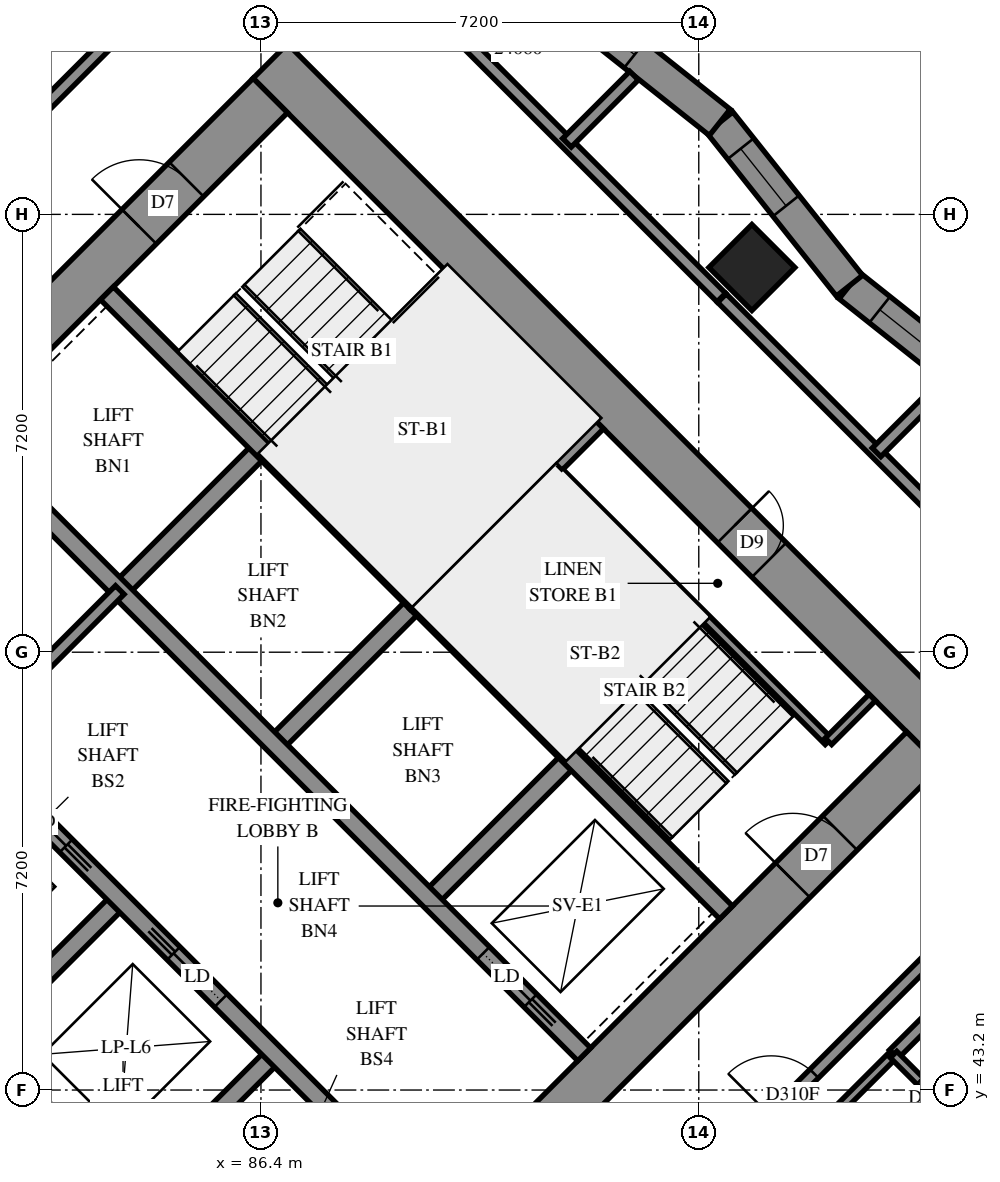
"""IFC4 building model, lengths in metres.
Left out: names, types, materials, properties, quantities, classifications, styles, units other than length and angle.
Written with IfcOpenShell. Run it as: python <this file> out.ifc"""

import sys

from ifc_helpers import new_model, si_unit, direction, frame, frame_2d, origin, origin_2d, place, context, subcontext, project, spatial, polyline, rectangle, outline, extrude, element, fill, save


model = new_model("IFC4")
c1 = context("Model", 3, precision=1e-05, world=origin(), true_north=direction((0.0, 1.0)))
c2 = subcontext(c1, "Body", "Model", "MODEL_VIEW")
j1 = project(units=[si_unit("LENGTHUNIT", "METRE"), si_unit("PLANEANGLEUNIT", "RADIAN")], contexts=[c1])
p1 = place(None, origin())
s1 = spatial("IfcSite", under=j1, at=p1, CompositionType="ELEMENT")
p2 = place(p1, origin())
s2 = spatial("IfcBuilding", under=s1, at=p2, CompositionType="ELEMENT")
p3 = place(p2, frame((0.0, 0.0, 91.4)))
s3 = spatial("IfcBuildingStorey", under=s2, at=p3, CompositionType="ELEMENT", Elevation=91.4)
p4 = place(p3, frame((94.474, 56.727, 0.0), z_axis=(0.0, 0.0, 1.0), x_axis=(0.7071067812, -0.7071067812, 0.0)))
e1 = element("IfcColumn", 1, at=p4, inside=s3, PredefinedType="COLUMN", context=c2, shape_type="SweptSolid", body=[
    extrude(rectangle(XDim=1.0, YDim=1.0, at=origin_2d()), origin(), (0.0, 0.0, 1.0), 3.1),
])
p5 = place(p3, frame((75.806, 49.373, -0.3), z_axis=(0.0, 0.0, 1.0), x_axis=(0.7071067812, -0.7071067812, 0.0)))
e2 = element("IfcWall", 2, at=p5, inside=s3, PredefinedType="SHEAR", context=c2, shape_type="SweptSolid", body=[
    extrude(rectangle(XDim=16.0, YDim=0.8, at=frame_2d((8.0, 0.0))), origin(), (0.0, 0.0, 1.0), 2.7),
])
p6 = place(p3, frame((86.554, 60.121, -0.3), z_axis=(0.0, 0.0, 1.0), x_axis=(0.7071067812, -0.7071067812, 0.0)))
e3 = element("IfcWall", 3, at=p6, inside=s3, PredefinedType="SHEAR", context=c2, shape_type="SweptSolid", body=[
    extrude(rectangle(XDim=16.0, YDim=0.8, at=frame_2d((8.0, 0.0))), origin(), (0.0, 0.0, 1.0), 2.7),
])
p7 = place(p6, frame((10.8, 0.0, 0.3)))
e4 = element("IfcOpeningElement", 4, at=p7, cuts=e3, PredefinedType="OPENING", context=c2, shape_type="SweptSolid", body=[
    extrude(rectangle(XDim=0.8, YDim=2.1, at=frame_2d((0.4, 1.05))), frame((0.0, 0.41, 0.0), z_axis=(0.0, -1.0, 0.0), x_axis=(1.0, 0.0, 0.0)), (0.0, 0.0, 1.0), 0.82),
])
p8 = place(p3, frame((76.372, 49.373, -0.3), z_axis=(0.0, 0.0, 1.0), x_axis=(0.7071067812, 0.7071067812, 0.0)))
e5 = element("IfcWall", 5, at=p8, inside=s3, PredefinedType="SHEAR", context=c2, shape_type="SweptSolid", body=[
    extrude(rectangle(XDim=14.4, YDim=0.8, at=frame_2d((7.2, 0.0))), origin(), (0.0, 0.0, 1.0), 2.7),
])
p9 = place(p8, frame((4.55, 0.0, 0.3)))
e6 = element("IfcOpeningElement", 6, at=p9, cuts=e5, PredefinedType="OPENING", context=c2, shape_type="SweptSolid", body=[
    extrude(rectangle(XDim=1.1, YDim=2.1, at=frame_2d((0.55, 1.05))), frame((0.0, 0.41, 0.0), z_axis=(0.0, -1.0, 0.0), x_axis=(1.0, 0.0, 0.0)), (0.0, 0.0, 1.0), 0.82),
])
p10 = place(p8, frame((11.35, 0.0, 0.3)))
e7 = element("IfcOpeningElement", 7, at=p10, cuts=e5, PredefinedType="OPENING", context=c2, shape_type="SweptSolid", body=[
    extrude(rectangle(XDim=1.1, YDim=2.1, at=frame_2d((0.55, 1.05))), frame((0.0, 0.41, 0.0), z_axis=(0.0, -1.0, 0.0), x_axis=(1.0, 0.0, 0.0)), (0.0, 0.0, 1.0), 0.82),
])
p11 = place(p3, frame((87.12, 38.625, -0.3), z_axis=(0.0, 0.0, 1.0), x_axis=(0.7071067812, 0.7071067812, 0.0)))
e8 = element("IfcWall", 8, at=p11, inside=s3, PredefinedType="SHEAR", context=c2, shape_type="SweptSolid", body=[
    extrude(rectangle(XDim=14.4, YDim=0.8, at=frame_2d((7.2, 0.0))), origin(), (0.0, 0.0, 1.0), 2.7),
])
p12 = place(p11, frame((4.55, 0.0, 0.3)))
e9 = element("IfcOpeningElement", 9, at=p12, cuts=e8, PredefinedType="OPENING", context=c2, shape_type="SweptSolid", body=[
    extrude(rectangle(XDim=1.1, YDim=2.1, at=frame_2d((0.55, 1.05))), frame((0.0, 0.41, 0.0), z_axis=(0.0, -1.0, 0.0), x_axis=(1.0, 0.0, 0.0)), (0.0, 0.0, 1.0), 0.82),
])
p13 = place(p11, frame((11.35, 0.0, 0.3)))
e10 = element("IfcOpeningElement", 10, at=p13, cuts=e8, PredefinedType="OPENING", context=c2, shape_type="SweptSolid", body=[
    extrude(rectangle(XDim=1.1, YDim=2.1, at=frame_2d((0.55, 1.05))), frame((0.0, 0.41, 0.0), z_axis=(0.0, -1.0, 0.0), x_axis=(1.0, 0.0, 0.0)), (0.0, 0.0, 1.0), 0.82),
])
p14 = place(p3, frame((84.079, 51.423, 0.0), z_axis=(0.0, 0.0, 1.0), x_axis=(0.7071219326, 0.7070916295, 0.0)))
e11 = element("IfcWall", 11, at=p14, inside=s3, PredefinedType="SOLIDWALL", context=c2, shape_type="SweptSolid", body=[
    extrude(rectangle(XDim=3.3, YDim=0.3, at=frame_2d((1.65, 0.0))), origin(), (0.0, 0.0, 1.0), 3.1),
])
p15 = place(p3, frame((81.746, 43.999, 0.0), z_axis=(0.0, 0.0, 1.0), x_axis=(0.7071067812, 0.7071067812, 0.0)))
e12 = element("IfcWall", 12, at=p15, inside=s3, PredefinedType="SOLIDWALL", context=c2, shape_type="SweptSolid", body=[
    extrude(rectangle(XDim=3.3, YDim=0.3, at=frame_2d((1.65, 0.0))), origin(), (0.0, 0.0, 1.0), 3.1),
])
p16 = place(p3, frame((86.625, 48.878, 0.0), z_axis=(0.0, 0.0, 1.0), x_axis=(0.7071067812, 0.7071067812, 0.0)))
e13 = element("IfcWall", 13, at=p16, inside=s3, PredefinedType="SOLIDWALL", context=c2, shape_type="SweptSolid", body=[
    extrude(rectangle(XDim=3.3, YDim=0.3, at=frame_2d((1.65, 0.0))), origin(), (0.0, 0.0, 1.0), 3.1),
])
p17 = place(p3, frame((84.291, 41.453, 0.0), z_axis=(0.0, 0.0, 1.0), x_axis=(0.7071067812, 0.7071067812, 0.0)))
e14 = element("IfcWall", 14, at=p17, inside=s3, PredefinedType="SOLIDWALL", context=c2, shape_type="SweptSolid", body=[
    extrude(rectangle(XDim=3.3, YDim=0.3, at=frame_2d((1.65, 0.0))), origin(), (0.0, 0.0, 1.0), 3.1),
])
p18 = place(p3, frame((89.17, 46.332, 0.0), z_axis=(0.0, 0.0, 1.0), x_axis=(0.7071067812, 0.7071067812, 0.0)))
e15 = element("IfcWall", 15, at=p18, inside=s3, PredefinedType="SOLIDWALL", context=c2, shape_type="SweptSolid", body=[
    extrude(rectangle(XDim=3.3, YDim=0.3, at=frame_2d((1.65, 0.0))), origin(), (0.0, 0.0, 1.0), 3.1),
])
p19 = place(p3, frame((78.988, 51.423, 0.0), z_axis=(0.0, 0.0, 1.0), x_axis=(0.7071067812, -0.7071067812, 0.0)))
e16 = element("IfcWall", 16, at=p19, inside=s3, PredefinedType="SOLIDWALL", context=c2, shape_type="SweptSolid", body=[
    extrude(rectangle(XDim=14.4, YDim=0.3, at=frame_2d((7.2, 0.0))), origin(), (0.0, 0.0, 1.0), 3.1),
])
p20 = place(p19, frame((1.25, 0.0, 0.0)))
e17 = element("IfcOpeningElement", 17, at=p20, cuts=e16, PredefinedType="OPENING", context=c2, shape_type="SweptSolid", body=[
    extrude(rectangle(XDim=1.1, YDim=2.1, at=frame_2d((0.55, 1.05))), frame((0.0, 0.16, 0.0), z_axis=(0.0, -1.0, 0.0), x_axis=(1.0, 0.0, 0.0)), (0.0, 0.0, 1.0), 0.32),
])
p21 = place(p19, frame((4.85, 0.0, 0.0)))
e18 = element("IfcOpeningElement", 18, at=p21, cuts=e16, PredefinedType="OPENING", context=c2, shape_type="SweptSolid", body=[
    extrude(rectangle(XDim=1.1, YDim=2.1, at=frame_2d((0.55, 1.05))), frame((0.0, 0.16, 0.0), z_axis=(0.0, -1.0, 0.0), x_axis=(1.0, 0.0, 0.0)), (0.0, 0.0, 1.0), 0.32),
])
p22 = place(p19, frame((8.45, 0.0, 0.0)))
e19 = element("IfcOpeningElement", 19, at=p22, cuts=e16, PredefinedType="OPENING", context=c2, shape_type="SweptSolid", body=[
    extrude(rectangle(XDim=1.1, YDim=2.1, at=frame_2d((0.55, 1.05))), frame((0.0, 0.16, 0.0), z_axis=(0.0, -1.0, 0.0), x_axis=(1.0, 0.0, 0.0)), (0.0, 0.0, 1.0), 0.32),
])
p23 = place(p19, frame((12.05, 0.0, 0.0)))
e20 = element("IfcOpeningElement", 20, at=p23, cuts=e16, PredefinedType="OPENING", context=c2, shape_type="SweptSolid", body=[
    extrude(rectangle(XDim=1.1, YDim=2.1, at=frame_2d((0.55, 1.05))), frame((0.0, 0.16, 0.0), z_axis=(0.0, -1.0, 0.0), x_axis=(1.0, 0.0, 0.0)), (0.0, 0.0, 1.0), 0.32),
])
p24 = place(p3, frame((81.534, 53.969, 0.0), z_axis=(0.0, 0.0, 1.0), x_axis=(0.707103309, -0.7071102534, 0.0)))
e21 = element("IfcWall", 21, at=p24, inside=s3, PredefinedType="SOLIDWALL", context=c2, shape_type="SweptSolid", body=[
    extrude(rectangle(XDim=14.4, YDim=0.3, at=frame_2d((7.2, 0.0))), origin(), (0.0, 0.0, 1.0), 3.1),
])
p25 = place(p24, frame((12.05, 0.0, 0.0)))
e22 = element("IfcOpeningElement", 22, at=p25, cuts=e21, PredefinedType="OPENING", context=c2, shape_type="SweptSolid", body=[
    extrude(rectangle(XDim=1.1, YDim=2.1, at=frame_2d((0.55, 1.05))), frame((0.0, 0.16, 0.0), z_axis=(0.0, -1.0, 0.0), x_axis=(1.0, 0.0, 0.0)), (0.0, 0.0, 1.0), 0.32),
])
for number, where, z_axis, x_axis in (
    (23, (83.867, 56.302, 0.0), (0.0, 0.0, 1.0), (0.707, -0.707, 0.0)),
    (24, (88.958, 51.211, 0.0), (0.0, 0.0, 1.0), (0.707, -0.707, 0.0)),
):
    element("IfcWall", number, at=place(p3, frame(where, z_axis=z_axis, x_axis=x_axis)), inside=s3, PredefinedType="SOLIDWALL", context=c2, shape_type="SweptSolid", body=[
        extrude(rectangle(XDim=7.2, YDim=0.3, at=frame_2d((3.6, 0.0))), origin(), (0.0, 0.0, 1.0), 3.1),
    ])
p26 = place(p3, frame((88.958, 51.211, 0.0), z_axis=(0.0, 0.0, 1.0), x_axis=(0.7071067812, 0.7071067812, 0.0)))
e25 = element("IfcWall", 25, at=p26, inside=s3, PredefinedType="SOLIDWALL", context=c2, shape_type="SweptSolid", body=[
    extrude(rectangle(XDim=4.2, YDim=0.3, at=frame_2d((2.1, 0.0))), origin(), (0.0, 0.0, 1.0), 3.1),
])
p27 = place(p3, frame((98.764, 54.294, 0.0), z_axis=(0.0, 0.0, 1.0), x_axis=(-0.7831079243, 0.6218858246, 0.0)))
e26 = element("IfcWall", 26, at=p27, inside=s3, PredefinedType="SOLIDWALL", context=c2, shape_type="SweptSolid", body=[
    extrude(outline(polyline([(-0.032, -0.275), (3.398, -0.275), (3.462, 0.275), (0.032, 0.275), (-0.032, -0.275)])), origin(), (0.0, 0.0, 1.0), 3.1),
])
p28 = place(p27, frame((1.596, 0.0, 0.5)))
e27 = element("IfcOpeningElement", 27, at=p28, cuts=e26, PredefinedType="OPENING", context=c2, shape_type="SweptSolid", body=[
    extrude(rectangle(XDim=1.2, YDim=2.45, at=frame_2d((0.6, 1.225))), frame((0.0, 0.285, 0.0), z_axis=(0.0, -1.0, 0.0), x_axis=(1.0, 0.0, 0.0)), (0.0, 0.0, 1.0), 0.57),
])
p29 = place(p3, frame((96.078, 56.427, 0.0), z_axis=(0.0, 0.0, 1.0), x_axis=(-0.6218858246, 0.7831079243, 0.0)))
e28 = element("IfcWall", 28, at=p29, inside=s3, PredefinedType="SOLIDWALL", context=c2, shape_type="SweptSolid", body=[
    extrude(outline(polyline([(0.032, -0.275), (3.462, -0.275), (3.398, 0.275), (-0.032, 0.275), (0.032, -0.275)])), origin(), (0.0, 0.0, 1.0), 3.1),
])
p30 = place(p29, frame((1.677, 0.0, 0.5)))
e29 = element("IfcOpeningElement", 29, at=p30, cuts=e28, PredefinedType="OPENING", context=c2, shape_type="SweptSolid", body=[
    extrude(rectangle(XDim=1.2, YDim=2.45, at=frame_2d((0.6, 1.225))), frame((0.0, 0.285, 0.0), z_axis=(0.0, -1.0, 0.0), x_axis=(1.0, 0.0, 0.0)), (0.0, 0.0, 1.0), 0.57),
])
p31 = place(p3, frame((93.945, 59.113, 0.0), z_axis=(0.0, 0.0, 1.0), x_axis=(-0.7830966489, 0.621900023, 0.0)))
e30 = element("IfcWall", 30, at=p31, inside=s3, PredefinedType="SOLIDWALL", context=c2, shape_type="SweptSolid", body=[
    extrude(outline(polyline([(-0.032, -0.275), (3.398, -0.275), (3.462, 0.275), (0.032, 0.275), (-0.032, -0.275)])), origin(), (0.0, 0.0, 1.0), 3.1),
])
p32 = place(p31, frame((1.789, 0.0, 0.5)))
e31 = element("IfcOpeningElement", 31, at=p32, cuts=e30, PredefinedType="OPENING", context=c2, shape_type="SweptSolid", body=[
    extrude(rectangle(XDim=1.2, YDim=2.45, at=frame_2d((0.6, 1.225))), frame((0.0, 0.285, 0.0), z_axis=(0.0, -1.0, 0.0), x_axis=(1.0, 0.0, 0.0)), (0.0, 0.0, 1.0), 0.57),
])
p33 = place(p3, frame((91.313, 53.354, 0.0), z_axis=(0.0, 0.0, 1.0), x_axis=(0.7071147811, -0.7070987812, 0.0)))
e32 = element("IfcWall", 32, at=p33, inside=s3, PredefinedType="PARTITIONING", context=c2, shape_type="SweptSolid", body=[
    extrude(rectangle(XDim=6.25, YDim=0.15, at=frame_2d((3.125, 0.0))), origin(), (0.0, 0.0, 1.0), 3.1),
])
p34 = place(p3, frame((95.732, 48.934, 0.0), z_axis=(0.0, 0.0, 1.0), x_axis=(0.7071067812, 0.7071067812, 0.0)))
e33 = element("IfcWall", 33, at=p34, inside=s3, PredefinedType="PARTITIONING", context=c2, shape_type="SweptSolid", body=[
    extrude(rectangle(XDim=1.02, YDim=0.15, at=frame_2d((0.51, 0.0))), origin(), (0.0, 0.0, 1.0), 3.1),
])
p35 = place(p3, frame((81.534, 48.878, 0.0), z_axis=(0.0, 0.0, 1.0), x_axis=(0.707092892, 0.7071206701, 0.0)))
e34 = element("IfcWall", 34, at=p35, inside=s3, PredefinedType="PARTITIONING", context=c2, shape_type="SweptSolid", body=[
    extrude(rectangle(XDim=3.6, YDim=0.2, at=frame_2d((1.8, 0.0))), origin(), (0.0, 0.0, 1.0), 3.1),
])
p36 = place(p3, frame((94.615, 42.587, 0.0), z_axis=(0.0, 0.0, 1.0), x_axis=(0.7071067812, 0.7071067812, 0.0)))
e35 = element("IfcWall", 35, at=p36, inside=s3, PredefinedType="PARTITIONING", context=c2, shape_type="SweptSolid", body=[
    extrude(rectangle(XDim=9.198, YDim=0.2, at=frame_2d((4.599, 0.0))), origin(), (0.0, 0.0, 1.0), 3.1),
])
p37 = place(p36, frame((0.248, 0.0, 0.0)))
e36 = element("IfcOpeningElement", 36, at=p37, cuts=e35, PredefinedType="OPENING", context=c2, shape_type="SweptSolid", body=[
    extrude(rectangle(XDim=1.0, YDim=2.1, at=frame_2d((0.5, 1.05))), frame((0.0, 0.11, 0.0), z_axis=(0.0, -1.0, 0.0), x_axis=(1.0, 0.0, 0.0)), (0.0, 0.0, 1.0), 0.22),
])
p38 = place(p3, frame((80.949, 58.477, 0.0), z_axis=(0.0, 0.0, 1.0), x_axis=(0.7071122504, 0.707101312, 0.0)))
e37 = element("IfcWall", 37, at=p38, inside=s3, PredefinedType="PARTITIONING", context=c2, shape_type="SweptSolid", body=[
    extrude(rectangle(XDim=9.142, YDim=0.2, at=frame_2d((4.571, 0.0))), origin(), (0.0, 0.0, 1.0), 3.1),
])
p39 = place(p3, frame((96.805, 43.787, 0.0), z_axis=(0.0, 0.0, 1.0), x_axis=(0.7071126983, 0.707100864, 0.0)))
e38 = element("IfcWall", 38, at=p39, inside=s3, PredefinedType="PARTITIONING", context=c2, shape_type="SweptSolid", body=[
    extrude(rectangle(XDim=8.45, YDim=0.2, at=frame_2d((4.225, 0.0))), origin(), (0.0, 0.0, 1.0), 3.1),
])
p40 = place(p3, frame((80.951, 57.489, 0.0), z_axis=(0.0, 0.0, 1.0), x_axis=(0.7071067812, 0.7071067812, 0.0)))
e39 = element("IfcWall", 39, at=p40, inside=s3, PredefinedType="PARTITIONING", context=c2, shape_type="SweptSolid", body=[
    extrude(rectangle(XDim=8.321, YDim=0.2, at=frame_2d((4.161, 0.0))), origin(), (0.0, 0.0, 1.0), 3.1),
])
p41 = place(p40, frame((0.851, 0.0, 0.0)))
e40 = element("IfcOpeningElement", 40, at=p41, cuts=e39, PredefinedType="OPENING", context=c2, shape_type="SweptSolid", body=[
    extrude(rectangle(XDim=1.0, YDim=2.1, at=frame_2d((0.5, 1.05))), frame((0.0, 0.11, 0.0), z_axis=(0.0, -1.0, 0.0), x_axis=(1.0, 0.0, 0.0)), (0.0, 0.0, 1.0), 0.22),
])
p42 = place(p3, frame((88.889, 61.315, 0.0), z_axis=(0.0, 0.0, 1.0), x_axis=(0.7071067812, -0.7071067812, 0.0)))
e41 = element("IfcWall", 41, at=p42, inside=s3, PredefinedType="PARTITIONING", context=c2, shape_type="SweptSolid", body=[
    extrude(rectangle(XDim=7.187, YDim=0.2, at=frame_2d((3.594, 0.0))), origin(), (0.0, 0.0, 1.0), 3.1),
])
p43 = place(p3, frame((93.981, 56.223, 0.0), z_axis=(0.0, 0.0, 1.0), x_axis=(0.7071067812, -0.7071067812, 0.0)))
e42 = element("IfcWall", 42, at=p43, inside=s3, PredefinedType="PARTITIONING", context=c2, shape_type="SweptSolid", body=[
    extrude(rectangle(XDim=7.184, YDim=0.2, at=frame_2d((3.592, 0.0))), origin(), (0.0, 0.0, 1.0), 3.1),
])
p44 = place(p3, frame((95.109, 42.091, 0.0), z_axis=(0.0, 0.0, 1.0), x_axis=(0.7071067812, 0.7071067812, 0.0)))
e43 = element("IfcWall", 43, at=p44, inside=s3, PredefinedType="PARTITIONING", context=c2, shape_type="SweptSolid", body=[
    extrude(rectangle(XDim=2.398, YDim=0.15, at=frame_2d((1.199, 0.0))), origin(), (0.0, 0.0, 1.0), 3.1),
])
p45 = place(p3, frame((96.803, 43.783, 0.0), z_axis=(0.0, 0.0, 1.0), x_axis=(0.7071067812, -0.7071067812, 0.0)))
e44 = element("IfcWall", 44, at=p45, inside=s3, PredefinedType="PARTITIONING", context=c2, shape_type="SweptSolid", body=[
    extrude(rectangle(XDim=1.901, YDim=0.15, at=frame_2d((0.95, 0.0))), origin(), (0.0, 0.0, 1.0), 3.1),
])
p46 = place(p45, frame((0.609, 0.0, 0.0)))
e45 = element("IfcOpeningElement", 45, at=p46, cuts=e44, PredefinedType="OPENING", context=c2, shape_type="SweptSolid", body=[
    extrude(rectangle(XDim=0.8, YDim=2.1, at=frame_2d((0.4, 1.05))), frame((0.0, 0.085, 0.0), z_axis=(0.0, -1.0, 0.0), x_axis=(1.0, 0.0, 0.0)), (0.0, 0.0, 1.0), 0.17),
])
p47 = place(p3, frame((96.523, 53.687, 0.0), z_axis=(0.0, 0.0, 1.0), x_axis=(0.7070756263, 0.7071379347, 0.0)))
e46 = element("IfcWall", 46, at=p47, inside=s3, PredefinedType="PARTITIONING", context=c2, shape_type="SweptSolid", body=[
    extrude(rectangle(XDim=1.605, YDim=0.2, at=frame_2d((0.802, 0.0))), origin(), (0.0, 0.0, 1.0), 3.1),
])
p48 = place(p3, frame((91.432, 58.778, 0.0), z_axis=(0.0, 0.0, 1.0), x_axis=(0.7071067812, 0.7071067812, 0.0)))
e47 = element("IfcWall", 47, at=p48, inside=s3, PredefinedType="PARTITIONING", context=c2, shape_type="SweptSolid", body=[
    extrude(rectangle(XDim=1.561, YDim=0.2, at=frame_2d((0.78, 0.0))), origin(), (0.0, 0.0, 1.0), 3.1),
])
p49 = place(p28, origin())
e48 = element("IfcWindow", 48, at=p49, inside=s3, PartitioningType="SINGLE_PANEL", PredefinedType="WINDOW", context=c2, shape_type="SweptSolid", body=[
    extrude(rectangle(XDim=1.2, YDim=2.45, at=frame_2d((0.6, 1.225))), frame((0.0, 0.155, 0.0), z_axis=(0.0, -1.0, 0.0), x_axis=(1.0, 0.0, 0.0)), (0.0, 0.0, 1.0), 0.06),
])
fill(e27, e48)
p50 = place(p30, origin())
e49 = element("IfcWindow", 49, at=p50, inside=s3, PartitioningType="SINGLE_PANEL", PredefinedType="WINDOW", context=c2, shape_type="SweptSolid", body=[
    extrude(rectangle(XDim=1.2, YDim=2.45, at=frame_2d((0.6, 1.225))), frame((0.0, 0.155, 0.0), z_axis=(0.0, -1.0, 0.0), x_axis=(1.0, 0.0, 0.0)), (0.0, 0.0, 1.0), 0.06),
])
fill(e29, e49)
p51 = place(p32, origin())
e50 = element("IfcWindow", 50, at=p51, inside=s3, PartitioningType="SINGLE_PANEL", PredefinedType="WINDOW", context=c2, shape_type="SweptSolid", body=[
    extrude(rectangle(XDim=1.2, YDim=2.45, at=frame_2d((0.6, 1.225))), frame((0.0, 0.155, 0.0), z_axis=(0.0, -1.0, 0.0), x_axis=(1.0, 0.0, 0.0)), (0.0, 0.0, 1.0), 0.06),
])
fill(e31, e50)
p52 = place(p7, origin())
e51 = element("IfcDoor", 51, at=p52, inside=s3, OperationType="SINGLE_SWING_RIGHT", PredefinedType="DOOR", context=c2, shape_type="SweptSolid", body=[
    extrude(rectangle(XDim=0.8, YDim=2.1, at=frame_2d((0.4, 1.05))), frame((0.0, -0.34, 0.0), z_axis=(0.0, -1.0, 0.0), x_axis=(1.0, 0.0, 0.0)), (0.0, 0.0, 1.0), 0.05),
])
fill(e4, e51)
p53 = place(p10, origin())
e52 = element("IfcDoor", 52, at=p53, inside=s3, OperationType="SINGLE_SWING_LEFT", PredefinedType="DOOR", context=c2, shape_type="SweptSolid", body=[
    extrude(rectangle(XDim=1.1, YDim=2.1, at=frame_2d((0.55, 1.05))), frame((0.0, 0.025, 0.0), z_axis=(0.0, -1.0, 0.0), x_axis=(1.0, 0.0, 0.0)), (0.0, 0.0, 1.0), 0.05),
])
fill(e7, e52)
p54 = place(p13, origin())
e53 = element("IfcDoor", 53, at=p54, inside=s3, OperationType="SINGLE_SWING_RIGHT", PredefinedType="DOOR", context=c2, shape_type="SweptSolid", body=[
    extrude(rectangle(XDim=1.1, YDim=2.1, at=frame_2d((0.55, 1.05))), frame((0.0, 0.025, 0.0), z_axis=(0.0, -1.0, 0.0), x_axis=(1.0, 0.0, 0.0)), (0.0, 0.0, 1.0), 0.05),
])
fill(e10, e53)
p55 = place(p21, origin())
e54 = element("IfcDoor", 54, at=p55, inside=s3, OperationType="SLIDING_TO_RIGHT", PredefinedType="DOOR", context=c2, shape_type="SweptSolid", body=[
    extrude(rectangle(XDim=1.1, YDim=2.1, at=frame_2d((0.55, 1.05))), frame((0.0, 0.025, 0.0), z_axis=(0.0, -1.0, 0.0), x_axis=(1.0, 0.0, 0.0)), (0.0, 0.0, 1.0), 0.05),
])
fill(e18, e54)
p56 = place(p22, origin())
e55 = element("IfcDoor", 55, at=p56, inside=s3, OperationType="SLIDING_TO_LEFT", PredefinedType="DOOR", context=c2, shape_type="SweptSolid", body=[
    extrude(rectangle(XDim=1.1, YDim=2.1, at=frame_2d((0.55, 1.05))), frame((0.0, 0.025, 0.0), z_axis=(0.0, -1.0, 0.0), x_axis=(1.0, 0.0, 0.0)), (0.0, 0.0, 1.0), 0.05),
])
fill(e19, e55)
p57 = place(p25, origin())
e56 = element("IfcDoor", 56, at=p57, inside=s3, OperationType="SLIDING_TO_RIGHT", PredefinedType="DOOR", context=c2, shape_type="SweptSolid", body=[
    extrude(rectangle(XDim=1.1, YDim=2.1, at=frame_2d((0.55, 1.05))), frame((0.0, 0.025, 0.0), z_axis=(0.0, -1.0, 0.0), x_axis=(1.0, 0.0, 0.0)), (0.0, 0.0, 1.0), 0.05),
])
fill(e22, e56)
p58 = place(p37, origin())
e57 = element("IfcDoor", 57, at=p58, inside=s3, OperationType="SINGLE_SWING_RIGHT", PredefinedType="DOOR", context=c2, shape_type="SweptSolid", body=[
    extrude(rectangle(XDim=1.0, YDim=2.1, at=frame_2d((0.5, 1.05))), frame((0.0, 0.025, 0.0), z_axis=(0.0, -1.0, 0.0), x_axis=(1.0, 0.0, 0.0)), (0.0, 0.0, 1.0), 0.05),
])
fill(e36, e57)
p59 = place(p46, origin())
e58 = element("IfcDoor", 58, at=p59, inside=s3, OperationType="SINGLE_SWING_RIGHT", PredefinedType="DOOR", context=c2, shape_type="SweptSolid", body=[
    extrude(rectangle(XDim=0.8, YDim=2.1, at=frame_2d((0.4, 1.05))), frame((0.0, 0.025, 0.0), z_axis=(0.0, -1.0, 0.0), x_axis=(1.0, 0.0, 0.0)), (0.0, 0.0, 1.0), 0.05),
])
fill(e45, e58)
save(model, sys.argv[1])
